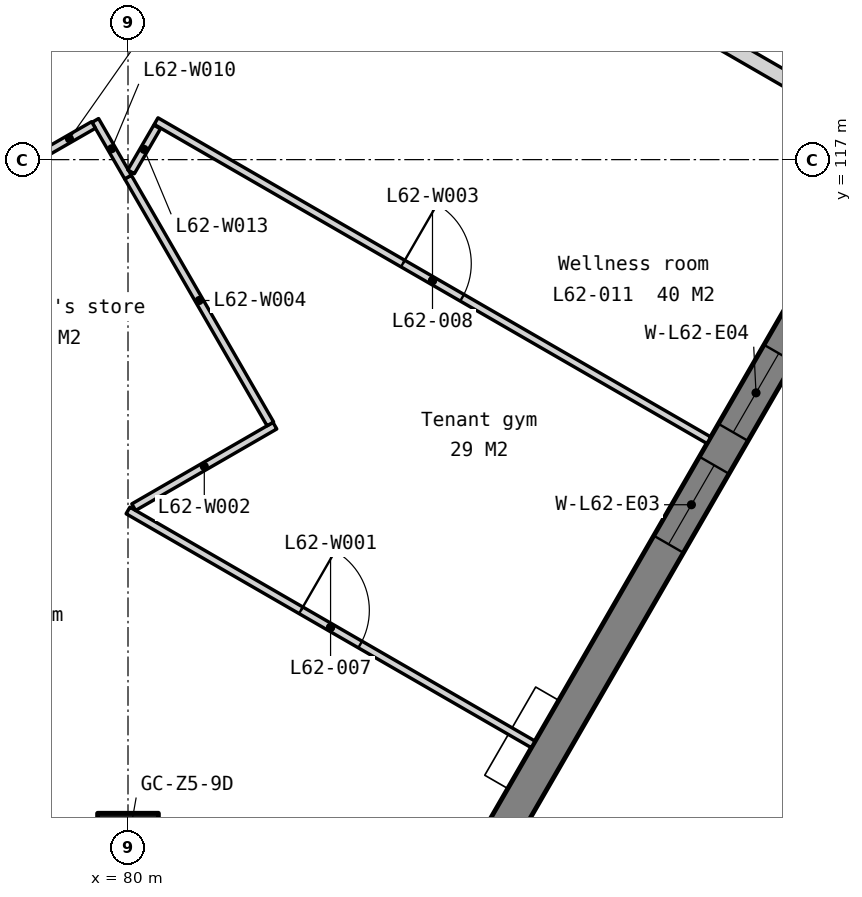
"""IFC4 building model, lengths in metres.
Left out: names, types, materials, properties, quantities, classifications, styles, units other than length and angle.
Written with IfcOpenShell. Run it as: python <this file> out.ifc"""

import sys

from ifc_helpers import new_model, si_unit, direction, frame, frame_2d, origin, origin_2d, place, context, subcontext, project, spatial, polyline, rectangle, outline, extrude, element, fill, save


model = new_model("IFC4")
c1 = context("Model", 3, precision=1e-05, world=origin(), true_north=direction((0.0, 1.0)))
c2 = subcontext(c1, "Body", "Model", "MODEL_VIEW")
j1 = project(units=[si_unit("LENGTHUNIT", "METRE"), si_unit("PLANEANGLEUNIT", "RADIAN")], contexts=[c1])
p1 = place(None, origin())
s1 = spatial("IfcSite", under=j1, at=p1, CompositionType="ELEMENT")
p2 = place(p1, origin())
s2 = spatial("IfcBuilding", under=s1, at=p2, CompositionType="ELEMENT")
p3 = place(p2, frame((0.0, 0.0, 254.3)))
s3 = spatial("IfcBuildingStorey", under=s2, at=p3, CompositionType="ELEMENT", Elevation=254.3)
p4 = place(p3, frame((80.0, 108.0, 0.0), z_axis=(0.0, 0.0, 1.0), x_axis=(1.0, 0.0, 0.0)))
e1 = element("IfcColumn", 1, at=p4, inside=s3, PredefinedType="COLUMN", context=c2, shape_type="SweptSolid", body=[
    extrude(rectangle(XDim=0.8, YDim=0.8, at=origin_2d()), origin(), (0.0, 0.0, 1.0), 3.9),
])
p5 = place(p3, frame((60.609, 133.207, -0.15), z_axis=(0.0, 0.0, 1.0), x_axis=(0.500002536638, -0.866023939251, 0.0)))
e2 = element("IfcWall", 2, at=p5, inside=s3, PredefinedType="SOLIDWALL", context=c2, shape_type="SweptSolid", body=[
    extrude(outline(polyline([(36.972, 0.0), (36.972, 3.9), (0.0, 3.9), (0.0, 0.0), (36.972, 0.0)])), frame((0.0, 0.225, 0.0), z_axis=(0.0, -1.0, 0.0), x_axis=(1.0, 0.0, 0.0)), (0.0, 0.0, 1.0), 0.45),
])
p6 = place(p5, frame((3.172, 0.0, 0.95)))
e3 = element("IfcOpeningElement", 3, at=p6, cuts=e2, PredefinedType="OPENING", context=c2, shape_type="SweptSolid", body=[
    extrude(rectangle(XDim=1.2, YDim=2.2, at=frame_2d((0.6, 1.1))), frame((0.0, 0.235, 0.0), z_axis=(0.0, -1.0, 0.0), x_axis=(1.0, 0.0, 0.0)), (0.0, 0.0, 1.0), 0.47),
])
p7 = place(p5, frame((4.872, 0.0, 0.95)))
e4 = element("IfcOpeningElement", 4, at=p7, cuts=e2, PredefinedType="OPENING", context=c2, shape_type="SweptSolid", body=[
    extrude(rectangle(XDim=1.2, YDim=2.2, at=frame_2d((0.6, 1.1))), frame((0.0, 0.235, 0.0), z_axis=(0.0, -1.0, 0.0), x_axis=(1.0, 0.0, 0.0)), (0.0, 0.0, 1.0), 0.47),
])
p8 = place(p5, frame((12.415, 0.0, 0.95)))
e5 = element("IfcOpeningElement", 5, at=p8, cuts=e2, PredefinedType="OPENING", context=c2, shape_type="SweptSolid", body=[
    extrude(rectangle(XDim=1.2, YDim=2.2, at=frame_2d((0.6, 1.1))), frame((0.0, 0.235, 0.0), z_axis=(0.0, -1.0, 0.0), x_axis=(1.0, 0.0, 0.0)), (0.0, 0.0, 1.0), 0.47),
])
p9 = place(p5, frame((14.115, 0.0, 0.95)))
e6 = element("IfcOpeningElement", 6, at=p9, cuts=e2, PredefinedType="OPENING", context=c2, shape_type="SweptSolid", body=[
    extrude(rectangle(XDim=1.2, YDim=2.2, at=frame_2d((0.6, 1.1))), frame((0.0, 0.235, 0.0), z_axis=(0.0, -1.0, 0.0), x_axis=(1.0, 0.0, 0.0)), (0.0, 0.0, 1.0), 0.47),
])
p10 = place(p5, frame((21.658, 0.0, 0.95)))
e7 = element("IfcOpeningElement", 7, at=p10, cuts=e2, PredefinedType="OPENING", context=c2, shape_type="SweptSolid", body=[
    extrude(rectangle(XDim=1.2, YDim=2.2, at=frame_2d((0.6, 1.1))), frame((0.0, 0.235, 0.0), z_axis=(0.0, -1.0, 0.0), x_axis=(1.0, 0.0, 0.0)), (0.0, 0.0, 1.0), 0.47),
])
p11 = place(p5, frame((23.358, 0.0, 0.95)))
e8 = element("IfcOpeningElement", 8, at=p11, cuts=e2, PredefinedType="OPENING", context=c2, shape_type="SweptSolid", body=[
    extrude(rectangle(XDim=1.2, YDim=2.2, at=frame_2d((0.6, 1.1))), frame((0.0, 0.235, 0.0), z_axis=(0.0, -1.0, 0.0), x_axis=(1.0, 0.0, 0.0)), (0.0, 0.0, 1.0), 0.47),
])
p12 = place(p5, frame((30.901, 0.0, 0.95)))
e9 = element("IfcOpeningElement", 9, at=p12, cuts=e2, PredefinedType="OPENING", context=c2, shape_type="SweptSolid", body=[
    extrude(rectangle(XDim=1.2, YDim=2.2, at=frame_2d((0.6, 1.1))), frame((0.0, 0.235, 0.0), z_axis=(0.0, -1.0, 0.0), x_axis=(1.0, 0.0, 0.0)), (0.0, 0.0, 1.0), 0.47),
])
p13 = place(p5, frame((32.601, 0.0, 0.95)))
e10 = element("IfcOpeningElement", 10, at=p13, cuts=e2, PredefinedType="OPENING", context=c2, shape_type="SweptSolid", body=[
    extrude(rectangle(XDim=1.2, YDim=2.2, at=frame_2d((0.6, 1.1))), frame((0.0, 0.235, 0.0), z_axis=(0.0, -1.0, 0.0), x_axis=(1.0, 0.0, 0.0)), (0.0, 0.0, 1.0), 0.47),
])
p14 = place(p3, frame((80.905, 101.188, -0.15), z_axis=(0.0, 0.0, 1.0), x_axis=(0.500002536638, 0.866023939251, 0.0)))
e11 = element("IfcWall", 11, at=p14, inside=s3, PredefinedType="SOLIDWALL", context=c2, shape_type="SweptSolid", body=[
    extrude(outline(polyline([(36.972, 0.0), (36.972, 3.9), (0.0, 3.9), (0.0, 0.0), (36.972, 0.0)])), frame((0.0, 0.225, 0.0), z_axis=(0.0, -1.0, 0.0), x_axis=(1.0, 0.0, 0.0)), (0.0, 0.0, 1.0), 0.45),
])
p15 = place(p14, frame((3.172, 0.0, 0.95)))
e12 = element("IfcOpeningElement", 12, at=p15, cuts=e11, PredefinedType="OPENING", context=c2, shape_type="SweptSolid", body=[
    extrude(rectangle(XDim=1.2, YDim=2.2, at=frame_2d((0.6, 1.1))), frame((0.0, 0.235, 0.0), z_axis=(0.0, -1.0, 0.0), x_axis=(1.0, 0.0, 0.0)), (0.0, 0.0, 1.0), 0.47),
])
p16 = place(p14, frame((4.872, 0.0, 0.95)))
e13 = element("IfcOpeningElement", 13, at=p16, cuts=e11, PredefinedType="OPENING", context=c2, shape_type="SweptSolid", body=[
    extrude(rectangle(XDim=1.2, YDim=2.2, at=frame_2d((0.6, 1.1))), frame((0.0, 0.235, 0.0), z_axis=(0.0, -1.0, 0.0), x_axis=(1.0, 0.0, 0.0)), (0.0, 0.0, 1.0), 0.47),
])
p17 = place(p14, frame((12.415, 0.0, 0.95)))
e14 = element("IfcOpeningElement", 14, at=p17, cuts=e11, PredefinedType="OPENING", context=c2, shape_type="SweptSolid", body=[
    extrude(rectangle(XDim=1.2, YDim=2.2, at=frame_2d((0.6, 1.1))), frame((0.0, 0.235, 0.0), z_axis=(0.0, -1.0, 0.0), x_axis=(1.0, 0.0, 0.0)), (0.0, 0.0, 1.0), 0.47),
])
p18 = place(p14, frame((14.115, 0.0, 0.95)))
e15 = element("IfcOpeningElement", 15, at=p18, cuts=e11, PredefinedType="OPENING", context=c2, shape_type="SweptSolid", body=[
    extrude(rectangle(XDim=1.2, YDim=2.2, at=frame_2d((0.6, 1.1))), frame((0.0, 0.235, 0.0), z_axis=(0.0, -1.0, 0.0), x_axis=(1.0, 0.0, 0.0)), (0.0, 0.0, 1.0), 0.47),
])
p19 = place(p14, frame((21.658, 0.0, 0.95)))
e16 = element("IfcOpeningElement", 16, at=p19, cuts=e11, PredefinedType="OPENING", context=c2, shape_type="SweptSolid", body=[
    extrude(rectangle(XDim=1.2, YDim=2.2, at=frame_2d((0.6, 1.1))), frame((0.0, 0.235, 0.0), z_axis=(0.0, -1.0, 0.0), x_axis=(1.0, 0.0, 0.0)), (0.0, 0.0, 1.0), 0.47),
])
p20 = place(p14, frame((23.358, 0.0, 0.95)))
e17 = element("IfcOpeningElement", 17, at=p20, cuts=e11, PredefinedType="OPENING", context=c2, shape_type="SweptSolid", body=[
    extrude(rectangle(XDim=1.2, YDim=2.2, at=frame_2d((0.6, 1.1))), frame((0.0, 0.235, 0.0), z_axis=(0.0, -1.0, 0.0), x_axis=(1.0, 0.0, 0.0)), (0.0, 0.0, 1.0), 0.47),
])
p21 = place(p14, frame((30.901, 0.0, 0.95)))
e18 = element("IfcOpeningElement", 18, at=p21, cuts=e11, PredefinedType="OPENING", context=c2, shape_type="SweptSolid", body=[
    extrude(rectangle(XDim=1.2, YDim=2.2, at=frame_2d((0.6, 1.1))), frame((0.0, 0.235, 0.0), z_axis=(0.0, -1.0, 0.0), x_axis=(1.0, 0.0, 0.0)), (0.0, 0.0, 1.0), 0.47),
])
p22 = place(p14, frame((32.601, 0.0, 0.95)))
e19 = element("IfcOpeningElement", 19, at=p22, cuts=e11, PredefinedType="OPENING", context=c2, shape_type="SweptSolid", body=[
    extrude(rectangle(XDim=1.2, YDim=2.2, at=frame_2d((0.6, 1.1))), frame((0.0, 0.235, 0.0), z_axis=(0.0, -1.0, 0.0), x_axis=(1.0, 0.0, 0.0)), (0.0, 0.0, 1.0), 0.47),
])
p23 = place(p3, frame((80.0, 112.384, 0.0), z_axis=(0.0, 0.0, 1.0), x_axis=(0.866037617598, -0.499978844458, 0.0)))
e20 = element("IfcWall", 20, at=p23, inside=s3, PredefinedType="PARTITIONING", context=c2, shape_type="SweptSolid", body=[
    extrude(rectangle(XDim=6.155, YDim=0.1, at=frame_2d((3.077, 0.0))), origin(), (0.0, 0.0, 1.0), 3.75),
])
p24 = place(p23, frame((2.627, 0.0, 0.0)))
e21 = element("IfcOpeningElement", 21, at=p24, cuts=e20, PredefinedType="OPENING", context=c2, shape_type="SweptSolid", body=[
    extrude(rectangle(XDim=0.9, YDim=2.1, at=frame_2d((0.45, 1.05))), frame((0.0, 0.06, 0.0), z_axis=(0.0, -1.0, 0.0), x_axis=(1.0, 0.0, 0.0)), (0.0, 0.0, 1.0), 0.12),
])
p25 = place(p3, frame((80.075, 112.427, 0.0), z_axis=(0.0, 0.0, 1.0), x_axis=(0.866049104564, 0.499958946799, 0.0)))
e22 = element("IfcWall", 22, at=p25, inside=s3, PredefinedType="PARTITIONING", context=c2, shape_type="SweptSolid", body=[
    extrude(rectangle(XDim=2.145, YDim=0.1, at=frame_2d((1.072, 0.0))), origin(), (0.0, 0.0, 1.0), 3.75),
])
p26 = place(p3, frame((80.37, 117.507, 0.0), z_axis=(0.0, 0.0, 1.0), x_axis=(0.866028733576, -0.499994232587, 0.0)))
e23 = element("IfcWall", 23, at=p26, inside=s3, PredefinedType="PARTITIONING", context=c2, shape_type="SweptSolid", body=[
    extrude(rectangle(XDim=8.398, YDim=0.1, at=frame_2d((4.199, 0.0))), origin(), (0.0, 0.0, 1.0), 3.75),
])
p27 = place(p26, frame((3.749, 0.0, 0.0)))
e24 = element("IfcOpeningElement", 24, at=p27, cuts=e23, PredefinedType="OPENING", context=c2, shape_type="SweptSolid", body=[
    extrude(rectangle(XDim=0.9, YDim=2.1, at=frame_2d((0.45, 1.05))), frame((0.0, 0.06, 0.0), z_axis=(0.0, -1.0, 0.0), x_axis=(1.0, 0.0, 0.0)), (0.0, 0.0, 1.0), 0.12),
])
p28 = place(p3, frame((80.0, 116.771, 0.0), z_axis=(0.0, 0.0, 1.0), x_axis=(0.499564586861, -0.866276643778, 0.0)))
e25 = element("IfcWall", 25, at=p28, inside=s3, PredefinedType="PARTITIONING", context=c2, shape_type="SweptSolid", body=[
    extrude(rectangle(XDim=3.749, YDim=0.1, at=frame_2d((1.875, 0.0))), origin(), (0.0, 0.0, 1.0), 3.75),
])
p29 = place(p3, frame((79.57, 117.516, 0.0), z_axis=(0.0, 0.0, 1.0), x_axis=(0.499861615673, -0.866105285272, 0.0)))
e26 = element("IfcWall", 26, at=p29, inside=s3, PredefinedType="PARTITIONING", context=c2, shape_type="SweptSolid", body=[
    extrude(rectangle(XDim=0.861, YDim=0.1, at=frame_2d((0.43, 0.0))), origin(), (0.0, 0.0, 1.0), 3.75),
])
p30 = place(p3, frame((85.628, 119.807, 0.0), z_axis=(0.0, 0.0, 1.0), x_axis=(0.866031670005, -0.49998914643, 0.0)))
e27 = element("IfcWall", 27, at=p30, inside=s3, PredefinedType="PARTITIONING", context=c2, shape_type="SweptSolid", body=[
    extrude(rectangle(XDim=4.992, YDim=0.2, at=frame_2d((2.496, 0.0))), origin(), (0.0, 0.0, 1.0), 3.75),
])
p31 = place(p3, frame((80.04, 116.84, 0.0), z_axis=(0.0, 0.0, 1.0), x_axis=(0.501867975937, 0.86494423793, 0.0)))
e28 = element("IfcWall", 28, at=p31, inside=s3, PredefinedType="PARTITIONING", context=c2, shape_type="SweptSolid", body=[
    extrude(rectangle(XDim=0.683, YDim=0.1, at=frame_2d((0.341, 0.0))), origin(), (0.0, 0.0, 1.0), 3.75),
])
p32 = place(p3, frame((78.913, 117.092, 0.0), z_axis=(0.0, 0.0, 1.0), x_axis=(0.867068692485, 0.498188601347, 0.0)))
e29 = element("IfcWall", 29, at=p32, inside=s3, PredefinedType="PARTITIONING", context=c2, shape_type="SweptSolid", body=[
    extrude(rectangle(XDim=0.731, YDim=0.1, at=frame_2d((0.365, 0.0))), origin(), (0.0, 0.0, 1.0), 3.75),
])
p33 = place(p17, origin())
e30 = element("IfcWindow", 30, at=p33, inside=s3, PartitioningType="SINGLE_PANEL", PredefinedType="WINDOW", context=c2, shape_type="SweptSolid", body=[
    extrude(rectangle(XDim=1.2, YDim=2.2, at=frame_2d((0.6, 1.1))), frame((0.0, 0.03, 0.0), z_axis=(0.0, -1.0, 0.0), x_axis=(1.0, 0.0, 0.0)), (0.0, 0.0, 1.0), 0.06),
])
fill(e14, e30)
p34 = place(p18, origin())
e31 = element("IfcWindow", 31, at=p34, inside=s3, PartitioningType="SINGLE_PANEL", PredefinedType="WINDOW", context=c2, shape_type="SweptSolid", body=[
    extrude(rectangle(XDim=1.2, YDim=2.2, at=frame_2d((0.6, 1.1))), frame((0.0, 0.03, 0.0), z_axis=(0.0, -1.0, 0.0), x_axis=(1.0, 0.0, 0.0)), (0.0, 0.0, 1.0), 0.06),
])
fill(e15, e31)
p35 = place(p24, origin())
e32 = element("IfcDoor", 32, at=p35, inside=s3, OperationType="SINGLE_SWING_LEFT", PredefinedType="DOOR", context=c2, shape_type="SweptSolid", body=[
    extrude(rectangle(XDim=0.9, YDim=2.1, at=frame_2d((0.45, 1.05))), frame((0.0, 0.025, 0.0), z_axis=(0.0, -1.0, 0.0), x_axis=(1.0, 0.0, 0.0)), (0.0, 0.0, 1.0), 0.05),
])
fill(e21, e32)
p36 = place(p27, origin())
e33 = element("IfcDoor", 33, at=p36, inside=s3, OperationType="SINGLE_SWING_LEFT", PredefinedType="DOOR", context=c2, shape_type="SweptSolid", body=[
    extrude(rectangle(XDim=0.9, YDim=2.1, at=frame_2d((0.45, 1.05))), frame((0.0, 0.025, 0.0), z_axis=(0.0, -1.0, 0.0), x_axis=(1.0, 0.0, 0.0)), (0.0, 0.0, 1.0), 0.05),
])
fill(e24, e33)
save(model, sys.argv[1])
